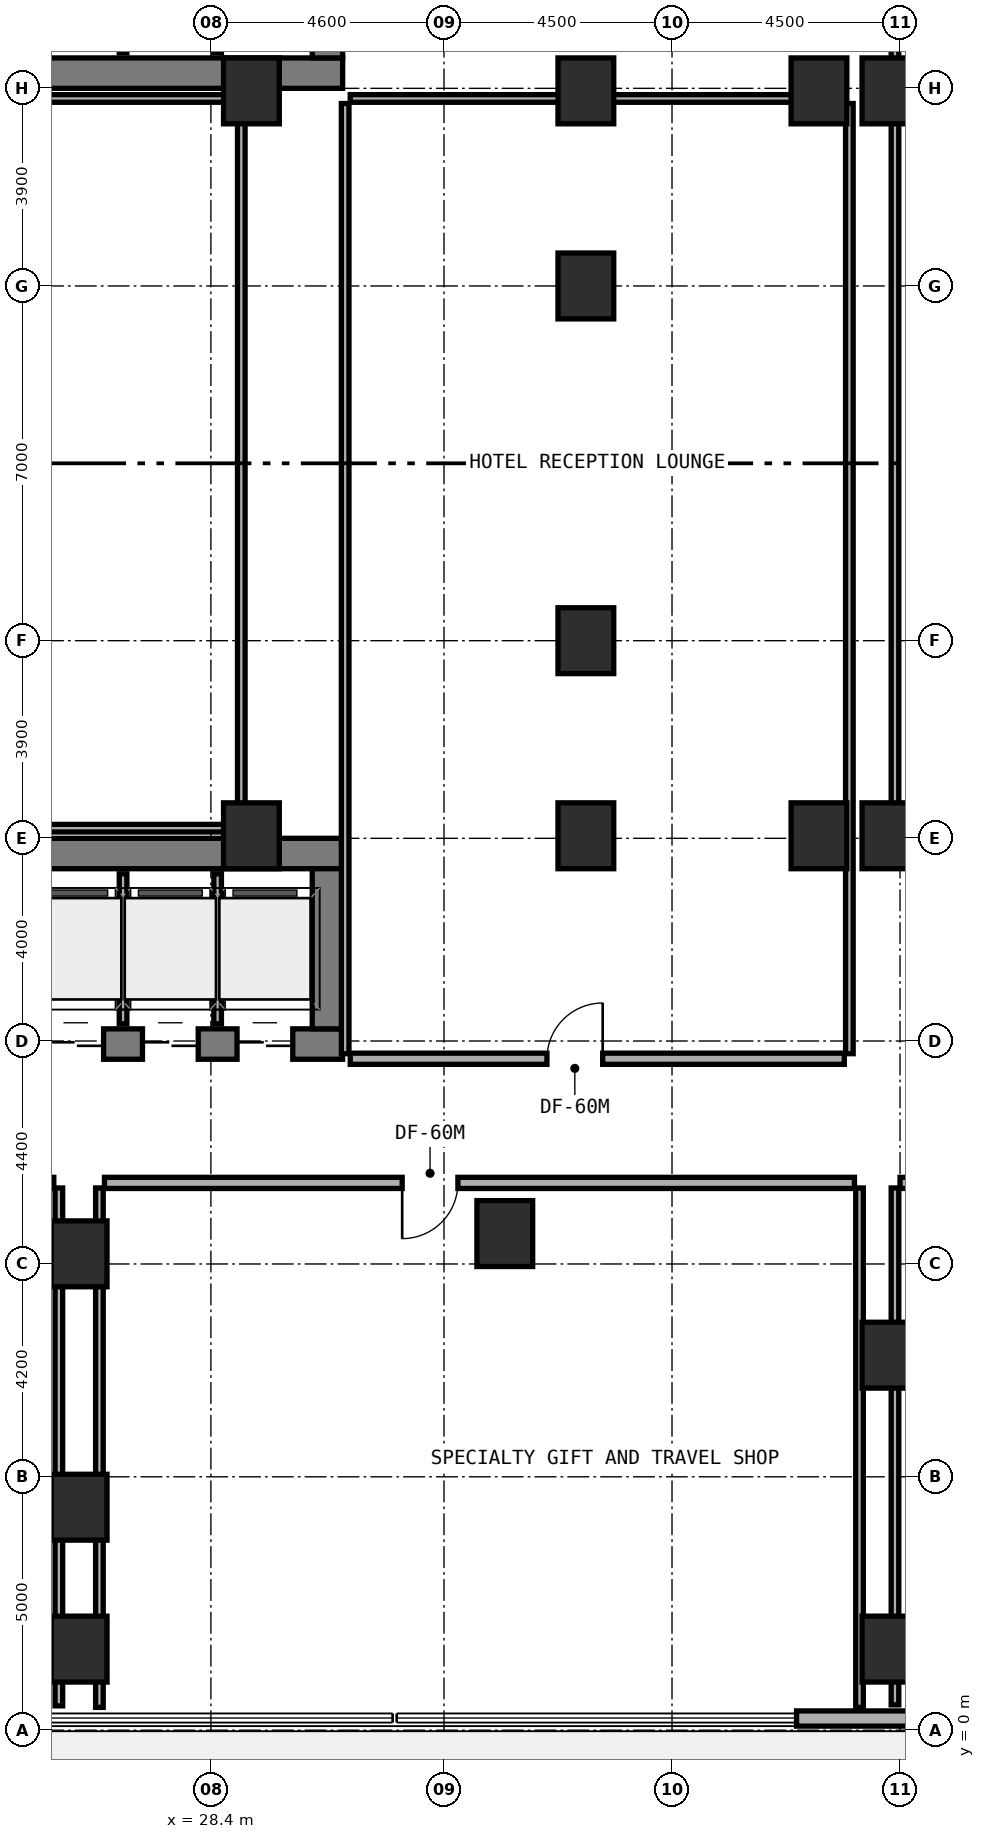
"""IFC4 building model, lengths in metres.
Left out: names, types, materials, properties, quantities, classifications, styles, units other than length and angle.
Written with IfcOpenShell. Run it as: python <this file> out.ifc"""

import sys

from ifc_helpers import new_model, si_unit, direction, frame, frame_2d, origin, origin_2d, place, context, subcontext, project, spatial, rectangle, extrude, element, fill, save


model = new_model("IFC4")
c1 = context("Model", 3, precision=1e-05, world=origin(), true_north=direction((0.0, 1.0)))
c2 = subcontext(c1, "Body", "Model", "MODEL_VIEW")
j1 = project(units=[si_unit("LENGTHUNIT", "METRE"), si_unit("PLANEANGLEUNIT", "RADIAN")], contexts=[c1])
p1 = place(None, origin())
s1 = spatial("IfcSite", under=j1, at=p1, CompositionType="ELEMENT")
p2 = place(p1, origin())
s2 = spatial("IfcBuilding", under=s1, at=p2, CompositionType="ELEMENT")
p3 = place(p2, origin())
s3 = spatial("IfcBuildingStorey", under=s2, at=p3, CompositionType="ELEMENT", Elevation=0.0)
p4 = place(p3, frame((6.2, 32.7, 0.0), z_axis=(0.0, 0.0, 1.0), x_axis=(1.0, 0.0, 0.0)))
e1 = element("IfcWall", 1, at=p4, inside=s3, PredefinedType="SHEAR", context=c2, shape_type="SweptSolid", body=[
    extrude(rectangle(XDim=24.8, YDim=0.6, at=frame_2d((12.4, 0.0))), origin(), (0.0, 0.0, 1.0), 5.4),
])
p5 = place(p3, frame((30.7, 33.0, 0.0), z_axis=(0.0, 0.0, 1.0), x_axis=(0.0, 1.0, 0.0)))
e2 = element("IfcWall", 2, at=p5, inside=s3, PredefinedType="SHEAR", context=c2, shape_type="SweptSolid", body=[
    extrude(rectangle(XDim=3.16, YDim=0.6, at=frame_2d((1.58, 0.0))), origin(), (0.0, 0.0, 1.0), 5.4),
])
p6 = place(p3, frame((6.2, 13.54, 0.0), z_axis=(0.0, 0.0, 1.0), x_axis=(1.0, 0.0, 0.0)))
e3 = element("IfcWall", 3, at=p6, inside=s3, PredefinedType="SHEAR", context=c2, shape_type="SweptSolid", body=[
    extrude(rectangle(XDim=24.8, YDim=0.6, at=frame_2d((12.4, 0.0))), origin(), (0.0, 0.0, 1.0), 5.4),
])
p7 = place(p6, frame((9.35, 0.0, 0.0)))
e4 = element("IfcOpeningElement", 4, at=p7, cuts=e3, PredefinedType="OPENING", context=c2, shape_type="SweptSolid", body=[
    extrude(rectangle(XDim=1.2, YDim=2.15, at=frame_2d((0.6, 1.075))), frame((0.0, 0.31, 0.0), z_axis=(0.0, -1.0, 0.0), x_axis=(1.0, 0.0, 0.0)), (0.0, 0.0, 1.0), 0.62),
])
p8 = place(p6, frame((6.15, 0.0, 0.0)))
e5 = element("IfcOpeningElement", 5, at=p8, cuts=e3, PredefinedType="OPENING", context=c2, shape_type="SweptSolid", body=[
    extrude(rectangle(XDim=1.3, YDim=2.15, at=frame_2d((0.65, 1.075))), frame((0.0, 0.31, 0.0), z_axis=(0.0, -1.0, 0.0), x_axis=(1.0, 0.0, 0.0)), (0.0, 0.0, 1.0), 0.62),
])
p9 = place(p6, frame((17.14, 0.0, 0.0)))
e6 = element("IfcOpeningElement", 6, at=p9, cuts=e3, PredefinedType="OPENING", context=c2, shape_type="SweptSolid", body=[
    extrude(rectangle(XDim=0.85, YDim=2.1, at=frame_2d((0.425, 1.05))), frame((0.0, 0.31, 0.0), z_axis=(0.0, -1.0, 0.0), x_axis=(1.0, 0.0, 0.0)), (0.0, 0.0, 1.0), 0.62),
])
p10 = place(p6, frame((18.983, 0.0, 0.0)))
e7 = element("IfcOpeningElement", 7, at=p10, cuts=e3, PredefinedType="OPENING", context=c2, shape_type="SweptSolid", body=[
    extrude(rectangle(XDim=1.1, YDim=2.15, at=frame_2d((0.55, 1.075))), frame((0.0, 0.31, 0.0), z_axis=(0.0, -1.0, 0.0), x_axis=(1.0, 0.0, 0.0)), (0.0, 0.0, 1.0), 0.62),
])
p11 = place(p6, frame((20.85, 0.0, 0.0)))
e8 = element("IfcOpeningElement", 8, at=p11, cuts=e3, PredefinedType="OPENING", context=c2, shape_type="SweptSolid", body=[
    extrude(rectangle(XDim=1.1, YDim=2.15, at=frame_2d((0.55, 1.075))), frame((0.0, 0.31, 0.0), z_axis=(0.0, -1.0, 0.0), x_axis=(1.0, 0.0, 0.0)), (0.0, 0.0, 1.0), 0.62),
])
p12 = place(p6, frame((22.716, 0.0, 0.0)))
e9 = element("IfcOpeningElement", 9, at=p12, cuts=e3, PredefinedType="OPENING", context=c2, shape_type="SweptSolid", body=[
    extrude(rectangle(XDim=1.1, YDim=2.15, at=frame_2d((0.55, 1.075))), frame((0.0, 0.31, 0.0), z_axis=(0.0, -1.0, 0.0), x_axis=(1.0, 0.0, 0.0)), (0.0, 0.0, 1.0), 0.62),
])
p13 = place(p3, frame((6.2, 17.3, 0.0), z_axis=(0.0, 0.0, 1.0), x_axis=(1.0, 0.0, 0.0)))
e10 = element("IfcWall", 10, at=p13, inside=s3, PredefinedType="SHEAR", context=c2, shape_type="SweptSolid", body=[
    extrude(rectangle(XDim=24.8, YDim=0.6, at=frame_2d((12.4, 0.0))), origin(), (0.0, 0.0, 1.0), 5.4),
])
p14 = place(p3, frame((30.7, 13.84, 0.0), z_axis=(0.0, 0.0, 1.0), x_axis=(0.0, 1.0, 0.0)))
e11 = element("IfcWall", 11, at=p14, inside=s3, PredefinedType="SHEAR", context=c2, shape_type="SweptSolid", body=[
    extrude(rectangle(XDim=3.16, YDim=0.6, at=frame_2d((1.58, 0.0))), origin(), (0.0, 0.0, 1.0), 5.4),
])
for number, where, z_axis, x_axis in (
    (12, (25.8, 9.4, 0.0), (0.0, 0.0, 1.0), (1.0, 0.0, 0.0)),
    (13, (34.2, 9.8, 0.0), (0.0, 0.0, 1.0), (1.0, 0.0, 0.0)),
    (14, (35.8, 21.5, 0.0), (0.0, 0.0, 1.0), (1.0, 0.0, 0.0)),
    (15, (35.8, 28.5, 0.0), (0.0, 0.0, 1.0), (1.0, 0.0, 0.0)),
    (16, (35.8, 17.65, 0.0), (0.0, 0.0, 1.0), (1.0, 0.0, 0.0)),
    (17, (35.8, 32.35, 0.0), (0.0, 0.0, 1.0), (1.0, 0.0, 0.0)),
    (18, (29.2, 17.65, 0.0), (0.0, 0.0, 1.0), (1.0, 0.0, 0.0)),
    (19, (29.2, 32.35, 0.0), (0.0, 0.0, 1.0), (1.0, 0.0, 0.0)),
    (20, (40.4, 17.65, 0.0), (0.0, 0.0, 1.0), (1.0, 0.0, 0.0)),
    (21, (40.4, 32.35, 0.0), (0.0, 0.0, 1.0), (1.0, 0.0, 0.0)),
    (22, (41.8, 17.65, 0.0), (0.0, 0.0, 1.0), (1.0, 0.0, 0.0)),
    (23, (41.8, 32.35, 0.0), (0.0, 0.0, 1.0), (1.0, 0.0, 0.0)),
    (24, (25.8, 1.6, 0.0), (0.0, 0.0, 1.0), (1.0, 0.0, 0.0)),
    (25, (41.8, 1.6, 0.0), (0.0, 0.0, 1.0), (1.0, 0.0, 0.0)),
    (26, (25.8, 4.4, 0.0), (0.0, 0.0, 1.0), (1.0, 0.0, 0.0)),
    (27, (41.8, 7.4, 0.0), (0.0, 0.0, 1.0), (1.0, 0.0, 0.0)),
):
    element("IfcColumn", number, at=place(p3, frame(where, z_axis=z_axis, x_axis=x_axis)), inside=s3, PredefinedType="COLUMN", context=c2, shape_type="SweptSolid", body=[
        extrude(rectangle(XDim=1.1, YDim=1.3, at=origin_2d()), origin(), (0.0, 0.0, 1.0), 5.4),
    ])
p15 = place(p3, frame((39.958, 0.23, 0.0), z_axis=(0.0, 0.0, 1.0), x_axis=(1.0, 0.0, 0.0)))
e28 = element("IfcWall", 28, at=p15, inside=s3, PredefinedType="STANDARD", context=c2, shape_type="SweptSolid", body=[
    extrude(rectangle(XDim=8.097, YDim=0.3, at=frame_2d((4.048, 0.0))), origin(), (0.0, 0.0, 1.0), 5.05),
])
p16 = place(p15, frame((2.842, 0.0, 0.0)))
e29 = element("IfcOpeningElement", 29, at=p16, cuts=e28, PredefinedType="OPENING", context=c2, shape_type="SweptSolid", body=[
    extrude(rectangle(XDim=2.4, YDim=2.6, at=frame_2d((1.2, 1.3))), frame((0.0, 0.16, 0.0), z_axis=(0.0, -1.0, 0.0), x_axis=(1.0, 0.0, 0.0)), (0.0, 0.0, 1.0), 0.32),
])
p17 = place(p3, frame((26.667, 33.1, 0.0), z_axis=(0.0, 0.0, 1.0), x_axis=(0.0, 1.0, 0.0)))
e30 = element("IfcWall", 30, at=p17, inside=s3, PredefinedType="PARTITIONING", context=c2, shape_type="SweptSolid", body=[
    extrude(rectangle(XDim=2.96, YDim=0.15, at=frame_2d((1.48, 0.0))), origin(), (0.0, 0.0, 1.0), 5.05),
])
p18 = place(p3, frame((28.533, 33.1, 0.0), z_axis=(0.0, 0.0, 1.0), x_axis=(0.0, 1.0, 0.0)))
e31 = element("IfcWall", 31, at=p18, inside=s3, PredefinedType="PARTITIONING", context=c2, shape_type="SweptSolid", body=[
    extrude(rectangle(XDim=2.96, YDim=0.15, at=frame_2d((1.48, 0.0))), origin(), (0.0, 0.0, 1.0), 4.125),
])
p19 = place(p3, frame((26.667, 13.94, 0.0), z_axis=(0.0, 0.0, 1.0), x_axis=(0.0, 1.0, 0.0)))
e32 = element("IfcWall", 32, at=p19, inside=s3, PredefinedType="PARTITIONING", context=c2, shape_type="SweptSolid", body=[
    extrude(rectangle(XDim=2.96, YDim=0.15, at=frame_2d((1.48, 0.0))), origin(), (0.0, 0.0, 1.0), 5.05),
])
p20 = place(p3, frame((28.533, 13.94, 0.0), z_axis=(0.0, 0.0, 1.0), x_axis=(0.0, 1.0, 0.0)))
e33 = element("IfcWall", 33, at=p20, inside=s3, PredefinedType="PARTITIONING", context=c2, shape_type="SweptSolid", body=[
    extrude(rectangle(XDim=2.96, YDim=0.15, at=frame_2d((1.48, 0.0))), origin(), (0.0, 0.0, 1.0), 4.125),
])
p21 = place(p3, frame((29.0, 17.9, 0.0), z_axis=(0.0, 0.0, 1.0), x_axis=(0.0, 1.0, 0.0)))
e34 = element("IfcWall", 34, at=p21, inside=s3, PredefinedType="PARTITIONING", context=c2, shape_type="SweptSolid", body=[
    extrude(rectangle(XDim=14.2, YDim=0.15, at=frame_2d((7.1, 0.0))), origin(), (0.0, 0.0, 1.0), 4.025),
])
for number, where, z_axis, x_axis in (
    (35, (11.9, 17.8, 0.0), (0.0, 0.0, 1.0), (1.0, 0.0, 0.0)),
    (36, (11.9, 32.2, 0.0), (0.0, 0.0, 1.0), (1.0, 0.0, 0.0)),
):
    element("IfcWall", number, at=place(p3, frame(where, z_axis=z_axis, x_axis=x_axis)), inside=s3, PredefinedType="PARTITIONING", context=c2, shape_type="SweptSolid", body=[
        extrude(rectangle(XDim=17.0, YDim=0.15, at=frame_2d((8.5, 0.0))), origin(), (0.0, 0.0, 1.0), 5.05),
    ])
p22 = place(p3, frame((31.05, 13.35, 0.0), z_axis=(0.0, 0.0, 1.0), x_axis=(0.0, 1.0, 0.0)))
e37 = element("IfcWall", 37, at=p22, inside=s3, PredefinedType="PARTITIONING", context=c2, shape_type="SweptSolid", body=[
    extrude(rectangle(XDim=18.75, YDim=0.15, at=frame_2d((9.375, 0.0))), origin(), (0.0, 0.0, 1.0), 4.025),
])
p23 = place(p3, frame((41.0, 13.35, 0.0), z_axis=(0.0, 0.0, 1.0), x_axis=(0.0, 1.0, 0.0)))
e38 = element("IfcWall", 38, at=p23, inside=s3, PredefinedType="PARTITIONING", context=c2, shape_type="SweptSolid", body=[
    extrude(rectangle(XDim=18.75, YDim=0.15, at=frame_2d((9.375, 0.0))), origin(), (0.0, 0.0, 1.0), 4.525),
])
p24 = place(p3, frame((31.15, 32.2, 0.0), z_axis=(0.0, 0.0, 1.0), x_axis=(1.0, 0.0, 0.0)))
e39 = element("IfcWall", 39, at=p24, inside=s3, PredefinedType="PARTITIONING", context=c2, shape_type="SweptSolid", body=[
    extrude(rectangle(XDim=9.75, YDim=0.15, at=frame_2d((4.875, 0.0))), origin(), (0.0, 0.0, 1.0), 4.125),
])
p25 = place(p3, frame((31.15, 13.25, 0.0), z_axis=(0.0, 0.0, 1.0), x_axis=(1.0, 0.0, 0.0)))
e40 = element("IfcWall", 40, at=p25, inside=s3, PredefinedType="SOLIDWALL", context=c2, shape_type="SweptSolid", body=[
    extrude(rectangle(XDim=9.75, YDim=0.22, at=frame_2d((4.875, 0.0))), origin(), (0.0, 0.0, 1.0), 4.575),
])
p26 = place(p25, frame((3.882, 0.0, 0.0)))
e41 = element("IfcOpeningElement", 41, at=p26, cuts=e40, PredefinedType="OPENING", context=c2, shape_type="SweptSolid", body=[
    extrude(rectangle(XDim=1.1, YDim=2.1, at=frame_2d((0.55, 1.05))), frame((0.0, 0.12, 0.0), z_axis=(0.0, -1.0, 0.0), x_axis=(1.0, 0.0, 0.0)), (0.0, 0.0, 1.0), 0.24),
])
p27 = place(p3, frame((25.4, 0.48, 0.0), z_axis=(0.0, 0.0, 1.0), x_axis=(0.0, 1.0, 0.0)))
e42 = element("IfcWall", 42, at=p27, inside=s3, PredefinedType="PARTITIONING", context=c2, shape_type="SweptSolid", body=[
    extrude(rectangle(XDim=10.22, YDim=0.15, at=frame_2d((5.11, 0.0))), origin(), (0.0, 0.0, 1.0), 4.425),
])
p28 = place(p3, frame((16.4, 10.8, 0.0), z_axis=(0.0, 0.0, 1.0), x_axis=(1.0, 0.0, 0.0)))
e43 = element("IfcWall", 43, at=p28, inside=s3, PredefinedType="SOLIDWALL", context=c2, shape_type="SweptSolid", body=[
    extrude(rectangle(XDim=8.9, YDim=0.22, at=frame_2d((4.45, 0.0))), origin(), (0.0, 0.0, 1.0), 5.05),
])
p29 = place(p28, frame((3.5, 0.0, 0.0)))
e44 = element("IfcOpeningElement", 44, at=p29, cuts=e43, PredefinedType="OPENING", context=c2, shape_type="SweptSolid", body=[
    extrude(rectangle(XDim=1.1, YDim=2.1, at=frame_2d((0.55, 1.05))), frame((0.0, 0.12, 0.0), z_axis=(0.0, -1.0, 0.0), x_axis=(1.0, 0.0, 0.0)), (0.0, 0.0, 1.0), 0.24),
])
p30 = place(p3, frame((26.2, 0.45, 0.0), z_axis=(0.0, 0.0, 1.0), x_axis=(0.0, 1.0, 0.0)))
e45 = element("IfcWall", 45, at=p30, inside=s3, PredefinedType="PARTITIONING", context=c2, shape_type="SweptSolid", body=[
    extrude(rectangle(XDim=10.25, YDim=0.15, at=frame_2d((5.125, 0.0))), origin(), (0.0, 0.0, 1.0), 4.125),
])
p31 = place(p3, frame((41.2, 0.45, 0.0), z_axis=(0.0, 0.0, 1.0), x_axis=(0.0, 1.0, 0.0)))
e46 = element("IfcWall", 46, at=p31, inside=s3, PredefinedType="PARTITIONING", context=c2, shape_type="SweptSolid", body=[
    extrude(rectangle(XDim=10.25, YDim=0.15, at=frame_2d((5.125, 0.0))), origin(), (0.0, 0.0, 1.0), 4.225),
])
p32 = place(p3, frame((26.3, 10.8, 0.0), z_axis=(0.0, 0.0, 1.0), x_axis=(1.0, 0.0, 0.0)))
e47 = element("IfcWall", 47, at=p32, inside=s3, PredefinedType="SOLIDWALL", context=c2, shape_type="SweptSolid", body=[
    extrude(rectangle(XDim=14.8, YDim=0.22, at=frame_2d((7.4, 0.0))), origin(), (0.0, 0.0, 1.0), 4.125),
])
p33 = place(p32, frame((5.875, 0.0, 0.0)))
e48 = element("IfcOpeningElement", 48, at=p33, cuts=e47, PredefinedType="OPENING", context=c2, shape_type="SweptSolid", body=[
    extrude(rectangle(XDim=1.1, YDim=2.1, at=frame_2d((0.55, 1.05))), frame((0.0, 0.12, 0.0), z_axis=(0.0, -1.0, 0.0), x_axis=(1.0, 0.0, 0.0)), (0.0, 0.0, 1.0), 0.24),
])
p34 = place(p3, frame((41.9, 0.5, 0.0), z_axis=(0.0, 0.0, 1.0), x_axis=(0.0, 1.0, 0.0)))
e49 = element("IfcWall", 49, at=p34, inside=s3, PredefinedType="PARTITIONING", context=c2, shape_type="SweptSolid", body=[
    extrude(rectangle(XDim=10.2, YDim=0.15, at=frame_2d((5.1, 0.0))), origin(), (0.0, 0.0, 1.0), 4.225),
])
p35 = place(p3, frame((42.0, 10.8, 0.0), z_axis=(0.0, 0.0, 1.0), x_axis=(1.0, 0.0, 0.0)))
e50 = element("IfcWall", 50, at=p35, inside=s3, PredefinedType="SOLIDWALL", context=c2, shape_type="SweptSolid", body=[
    extrude(rectangle(XDim=15.4, YDim=0.22, at=frame_2d((7.7, 0.0))), origin(), (0.0, 0.0, 1.0), 5.05),
])
p36 = place(p35, frame((6.425, 0.0, 0.0)))
e51 = element("IfcOpeningElement", 51, at=p36, cuts=e50, PredefinedType="OPENING", context=c2, shape_type="SweptSolid", body=[
    extrude(rectangle(XDim=1.1, YDim=2.1, at=frame_2d((0.55, 1.05))), frame((0.0, 0.12, 0.0), z_axis=(0.0, -1.0, 0.0), x_axis=(1.0, 0.0, 0.0)), (0.0, 0.0, 1.0), 0.24),
])
p37 = place(p3, frame((41.9, 17.85, 0.0), z_axis=(0.0, 0.0, 1.0), x_axis=(0.0, 1.0, 0.0)))
e52 = element("IfcWall", 52, at=p37, inside=s3, PredefinedType="PARTITIONING", context=c2, shape_type="SweptSolid", body=[
    extrude(rectangle(XDim=18.8, YDim=0.15, at=frame_2d((9.4, 0.0))), origin(), (0.0, 0.0, 1.0), 4.325),
])
p38 = place(p3, frame((42.0, 17.75, 0.0), z_axis=(0.0, 0.0, 1.0), x_axis=(1.0, 0.0, 0.0)))
e53 = element("IfcWall", 53, at=p38, inside=s3, PredefinedType="PARTITIONING", context=c2, shape_type="SweptSolid", body=[
    extrude(rectangle(XDim=15.4, YDim=0.15, at=frame_2d((7.7, 0.0))), origin(), (0.0, 0.0, 1.0), 4.325),
])
p39 = place(p10, frame((1.1, 0.0, 0.0), z_axis=(0.0, 0.0, 1.0), x_axis=(-1.0, 0.0, 0.0)))
e54 = element("IfcDoor", 54, at=p39, inside=s3, OperationType="DOUBLE_DOOR_SLIDING", PredefinedType="DOOR", context=c2, shape_type="SweptSolid", body=[
    extrude(rectangle(XDim=1.1, YDim=2.15, at=frame_2d((0.55, 1.075))), frame((0.0, 0.025, 0.0), z_axis=(0.0, -1.0, 0.0), x_axis=(1.0, 0.0, 0.0)), (0.0, 0.0, 1.0), 0.05),
])
fill(e7, e54)
p40 = place(p11, frame((1.1, 0.0, 0.0), z_axis=(0.0, 0.0, 1.0), x_axis=(-1.0, 0.0, 0.0)))
e55 = element("IfcDoor", 55, at=p40, inside=s3, OperationType="DOUBLE_DOOR_SLIDING", PredefinedType="DOOR", context=c2, shape_type="SweptSolid", body=[
    extrude(rectangle(XDim=1.1, YDim=2.15, at=frame_2d((0.55, 1.075))), frame((0.0, 0.025, 0.0), z_axis=(0.0, -1.0, 0.0), x_axis=(1.0, 0.0, 0.0)), (0.0, 0.0, 1.0), 0.05),
])
fill(e8, e55)
p41 = place(p12, frame((1.1, 0.0, 0.0), z_axis=(0.0, 0.0, 1.0), x_axis=(-1.0, 0.0, 0.0)))
e56 = element("IfcDoor", 56, at=p41, inside=s3, OperationType="DOUBLE_DOOR_SLIDING", PredefinedType="DOOR", context=c2, shape_type="SweptSolid", body=[
    extrude(rectangle(XDim=1.1, YDim=2.15, at=frame_2d((0.55, 1.075))), frame((0.0, 0.025, 0.0), z_axis=(0.0, -1.0, 0.0), x_axis=(1.0, 0.0, 0.0)), (0.0, 0.0, 1.0), 0.05),
])
fill(e9, e56)
p42 = place(p26, origin())
e57 = element("IfcDoor", 57, at=p42, inside=s3, OperationType="SINGLE_SWING_RIGHT", PredefinedType="DOOR", context=c2, shape_type="SweptSolid", body=[
    extrude(rectangle(XDim=1.1, YDim=2.1, at=frame_2d((0.55, 1.05))), frame((0.0, 0.025, 0.0), z_axis=(0.0, -1.0, 0.0), x_axis=(1.0, 0.0, 0.0)), (0.0, 0.0, 1.0), 0.05),
])
fill(e41, e57)
p43 = place(p33, frame((1.1, 0.0, 0.0), z_axis=(0.0, 0.0, 1.0), x_axis=(-1.0, 0.0, 0.0)))
e58 = element("IfcDoor", 58, at=p43, inside=s3, OperationType="SINGLE_SWING_RIGHT", PredefinedType="DOOR", context=c2, shape_type="SweptSolid", body=[
    extrude(rectangle(XDim=1.1, YDim=2.1, at=frame_2d((0.55, 1.05))), frame((0.0, 0.025, 0.0), z_axis=(0.0, -1.0, 0.0), x_axis=(1.0, 0.0, 0.0)), (0.0, 0.0, 1.0), 0.05),
])
fill(e48, e58)
save(model, sys.argv[1])
